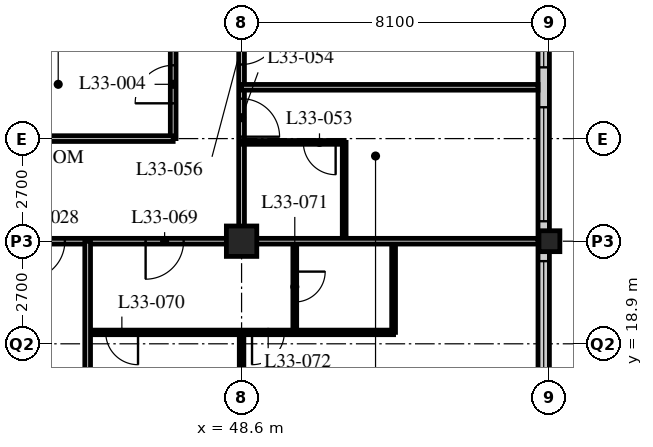
"""IFC4 building model, lengths in metres.
Left out: names, types, materials, properties, quantities, classifications, styles, units other than length and angle.
Written with IfcOpenShell. Run it as: python <this file> out.ifc"""

import sys

from ifc_helpers import new_model, si_unit, direction, frame, frame_2d, origin, origin_2d, place, context, subcontext, project, spatial, rectangle, hollow_rectangle, extrude, element, fill, save


model = new_model("IFC4")
c1 = context("Model", 3, precision=1e-05, world=origin(), true_north=direction((0.0, 1.0)))
c2 = subcontext(c1, "Body", "Model", "MODEL_VIEW")
j1 = project(units=[si_unit("LENGTHUNIT", "METRE"), si_unit("PLANEANGLEUNIT", "RADIAN")], contexts=[c1])
p1 = place(None, origin())
s1 = spatial("IfcSite", under=j1, at=p1, CompositionType="ELEMENT")
p2 = place(p1, origin())
s2 = spatial("IfcBuilding", under=s1, at=p2, CompositionType="ELEMENT")
p3 = place(p2, frame((0.0, 0.0, 130.6)))
s3 = spatial("IfcBuildingStorey", under=s2, at=p3, CompositionType="ELEMENT", Elevation=130.6)
p4 = place(p3, frame((48.6, 21.6, 0.0), z_axis=(0.0, 0.0, 1.0), x_axis=(1.0, 0.0, 0.0)))
e1 = element("IfcColumn", 1, at=p4, inside=s3, PredefinedType="COLUMN", context=c2, shape_type="SweptSolid", body=[
    extrude(hollow_rectangle(XDim=0.8, YDim=0.8, WallThickness=0.08, at=origin_2d()), origin(), (0.0, 0.0, 1.0), 3.4),
])
p5 = place(p3, frame((56.7, 21.6, 0.0), z_axis=(0.0, 0.0, 1.0), x_axis=(1.0, 0.0, 0.0)))
e2 = element("IfcColumn", 2, at=p5, inside=s3, PredefinedType="COLUMN", context=c2, shape_type="SweptSolid", body=[
    extrude(hollow_rectangle(XDim=0.55, YDim=0.55, WallThickness=0.04, at=origin_2d()), origin(), (0.0, 0.0, 1.0), 3.4),
])
p6 = place(p3, frame((56.55, 13.8, 0.0), z_axis=(0.0, 0.0, 1.0), x_axis=(0.0, 1.0, 0.0)))
e3 = element("IfcWall", 3, at=p6, inside=s3, PredefinedType="SOLIDWALL", context=c2, shape_type="SweptSolid", body=[
    extrude(rectangle(XDim=32.1, YDim=0.3, at=frame_2d((16.05, 0.0))), origin(), (0.0, 0.0, 1.0), 3.19),
])
p7 = place(p6, frame((0.225, 0.0, 0.9)))
e4 = element("IfcOpeningElement", 4, at=p7, cuts=e3, PredefinedType="OPENING", context=c2, shape_type="SweptSolid", body=[
    extrude(rectangle(XDim=3.0, YDim=2.0, at=frame_2d((1.5, 1.0))), frame((0.0, 0.16, 0.0), z_axis=(0.0, -1.0, 0.0), x_axis=(1.0, 0.0, 0.0)), (0.0, 0.0, 1.0), 0.32),
])
p8 = place(p6, frame((4.275, 0.0, 0.9)))
e5 = element("IfcOpeningElement", 5, at=p8, cuts=e3, PredefinedType="OPENING", context=c2, shape_type="SweptSolid", body=[
    extrude(rectangle(XDim=3.0, YDim=2.0, at=frame_2d((1.5, 1.0))), frame((0.0, 0.16, 0.0), z_axis=(0.0, -1.0, 0.0), x_axis=(1.0, 0.0, 0.0)), (0.0, 0.0, 1.0), 0.32),
])
p9 = place(p6, frame((8.325, 0.0, 0.9)))
e6 = element("IfcOpeningElement", 6, at=p9, cuts=e3, PredefinedType="OPENING", context=c2, shape_type="SweptSolid", body=[
    extrude(rectangle(XDim=3.0, YDim=2.0, at=frame_2d((1.5, 1.0))), frame((0.0, 0.16, 0.0), z_axis=(0.0, -1.0, 0.0), x_axis=(1.0, 0.0, 0.0)), (0.0, 0.0, 1.0), 0.32),
])
p10 = place(p6, frame((12.375, 0.0, 0.9)))
e7 = element("IfcOpeningElement", 7, at=p10, cuts=e3, PredefinedType="OPENING", context=c2, shape_type="SweptSolid", body=[
    extrude(rectangle(XDim=3.0, YDim=2.0, at=frame_2d((1.5, 1.0))), frame((0.0, 0.16, 0.0), z_axis=(0.0, -1.0, 0.0), x_axis=(1.0, 0.0, 0.0)), (0.0, 0.0, 1.0), 0.32),
])
p11 = place(p6, frame((16.425, 0.0, 0.9)))
e8 = element("IfcOpeningElement", 8, at=p11, cuts=e3, PredefinedType="OPENING", context=c2, shape_type="SweptSolid", body=[
    extrude(rectangle(XDim=3.0, YDim=2.0, at=frame_2d((1.5, 1.0))), frame((0.0, 0.16, 0.0), z_axis=(0.0, -1.0, 0.0), x_axis=(1.0, 0.0, 0.0)), (0.0, 0.0, 1.0), 0.32),
])
p12 = place(p6, frame((20.475, 0.0, 0.9)))
e9 = element("IfcOpeningElement", 9, at=p12, cuts=e3, PredefinedType="OPENING", context=c2, shape_type="SweptSolid", body=[
    extrude(rectangle(XDim=3.0, YDim=2.0, at=frame_2d((1.5, 1.0))), frame((0.0, 0.16, 0.0), z_axis=(0.0, -1.0, 0.0), x_axis=(1.0, 0.0, 0.0)), (0.0, 0.0, 1.0), 0.32),
])
p13 = place(p6, frame((24.525, 0.0, 0.9)))
e10 = element("IfcOpeningElement", 10, at=p13, cuts=e3, PredefinedType="OPENING", context=c2, shape_type="SweptSolid", body=[
    extrude(rectangle(XDim=3.0, YDim=2.0, at=frame_2d((1.5, 1.0))), frame((0.0, 0.16, 0.0), z_axis=(0.0, -1.0, 0.0), x_axis=(1.0, 0.0, 0.0)), (0.0, 0.0, 1.0), 0.32),
])
p14 = place(p6, frame((28.575, 0.0, 0.9)))
e11 = element("IfcOpeningElement", 11, at=p14, cuts=e3, PredefinedType="OPENING", context=c2, shape_type="SweptSolid", body=[
    extrude(rectangle(XDim=3.0, YDim=2.0, at=frame_2d((1.5, 1.0))), frame((0.0, 0.16, 0.0), z_axis=(0.0, -1.0, 0.0), x_axis=(1.0, 0.0, 0.0)), (0.0, 0.0, 1.0), 0.32),
])
p15 = place(p3, frame((8.1, 21.6, 0.0), z_axis=(0.0, 0.0, 1.0), x_axis=(1.0, 0.0, 0.0)))
e12 = element("IfcWall", 12, at=p15, inside=s3, PredefinedType="PARTITIONING", context=c2, shape_type="SweptSolid", body=[
    extrude(rectangle(XDim=40.5, YDim=0.15, at=frame_2d((20.25, 0.0))), origin(), (0.0, 0.0, 1.0), 2.578),
])
p16 = place(p15, frame((9.625, 0.0, 0.0)))
e13 = element("IfcOpeningElement", 13, at=p16, cuts=e12, PredefinedType="OPENING", context=c2, shape_type="SweptSolid", body=[
    extrude(rectangle(XDim=1.0, YDim=2.1, at=frame_2d((0.5, 1.05))), frame((0.0, 0.085, 0.0), z_axis=(0.0, -1.0, 0.0), x_axis=(1.0, 0.0, 0.0)), (0.0, 0.0, 1.0), 0.17),
])
p17 = place(p15, frame((21.775, 0.0, 0.0)))
e14 = element("IfcOpeningElement", 14, at=p17, cuts=e12, PredefinedType="OPENING", context=c2, shape_type="SweptSolid", body=[
    extrude(rectangle(XDim=1.0, YDim=2.1, at=frame_2d((0.5, 1.05))), frame((0.0, 0.085, 0.0), z_axis=(0.0, -1.0, 0.0), x_axis=(1.0, 0.0, 0.0)), (0.0, 0.0, 1.0), 0.17),
])
p18 = place(p15, frame((28.95, 0.0, 0.0)))
e15 = element("IfcOpeningElement", 15, at=p18, cuts=e12, PredefinedType="OPENING", context=c2, shape_type="SweptSolid", body=[
    extrude(rectangle(XDim=1.0, YDim=2.1, at=frame_2d((0.5, 1.05))), frame((0.0, 0.085, 0.0), z_axis=(0.0, -1.0, 0.0), x_axis=(1.0, 0.0, 0.0)), (0.0, 0.0, 1.0), 0.17),
])
p19 = place(p15, frame((34.85, 0.0, 0.0)))
e16 = element("IfcOpeningElement", 16, at=p19, cuts=e12, PredefinedType="OPENING", context=c2, shape_type="SweptSolid", body=[
    extrude(rectangle(XDim=1.0, YDim=2.1, at=frame_2d((0.5, 1.05))), frame((0.0, 0.085, 0.0), z_axis=(0.0, -1.0, 0.0), x_axis=(1.0, 0.0, 0.0)), (0.0, 0.0, 1.0), 0.17),
])
p20 = place(p15, frame((1.525, 0.0, 0.0)))
e17 = element("IfcOpeningElement", 17, at=p20, cuts=e12, PredefinedType="OPENING", context=c2, shape_type="SweptSolid", body=[
    extrude(rectangle(XDim=1.0, YDim=2.1, at=frame_2d((0.5, 1.05))), frame((0.0, 0.085, 0.0), z_axis=(0.0, -1.0, 0.0), x_axis=(1.0, 0.0, 0.0)), (0.0, 0.0, 1.0), 0.17),
])
p21 = place(p15, frame((37.975, 0.0, 0.0)))
e18 = element("IfcOpeningElement", 18, at=p21, cuts=e12, PredefinedType="OPENING", context=c2, shape_type="SweptSolid", body=[
    extrude(rectangle(XDim=1.0, YDim=2.1, at=frame_2d((0.5, 1.05))), frame((0.0, 0.085, 0.0), z_axis=(0.0, -1.0, 0.0), x_axis=(1.0, 0.0, 0.0)), (0.0, 0.0, 1.0), 0.17),
])
p22 = place(p3, frame((48.6, 21.6, 0.0), z_axis=(0.0, 0.0, 1.0), x_axis=(0.0, 1.0, 0.0)))
e19 = element("IfcWall", 19, at=p22, inside=s3, PredefinedType="PARTITIONING", context=c2, shape_type="SweptSolid", body=[
    extrude(rectangle(XDim=24.3, YDim=0.15, at=frame_2d((12.15, 0.0))), origin(), (0.0, 0.0, 1.0), 2.578),
])
p23 = place(p22, frame((2.75, 0.0, 0.0)))
e20 = element("IfcOpeningElement", 20, at=p23, cuts=e19, PredefinedType="OPENING", context=c2, shape_type="SweptSolid", body=[
    extrude(rectangle(XDim=1.0, YDim=2.1, at=frame_2d((0.5, 1.05))), frame((0.0, 0.085, 0.0), z_axis=(0.0, -1.0, 0.0), x_axis=(1.0, 0.0, 0.0)), (0.0, 0.0, 1.0), 0.17),
])
p24 = place(p22, frame((4.65, 0.0, 0.0)))
e21 = element("IfcOpeningElement", 21, at=p24, cuts=e19, PredefinedType="OPENING", context=c2, shape_type="SweptSolid", body=[
    extrude(rectangle(XDim=1.0, YDim=2.1, at=frame_2d((0.5, 1.05))), frame((0.0, 0.085, 0.0), z_axis=(0.0, -1.0, 0.0), x_axis=(1.0, 0.0, 0.0)), (0.0, 0.0, 1.0), 0.17),
])
p25 = place(p22, frame((10.0, 0.0, 0.0)))
e22 = element("IfcOpeningElement", 22, at=p25, cuts=e19, PredefinedType="OPENING", context=c2, shape_type="SweptSolid", body=[
    extrude(rectangle(XDim=1.0, YDim=2.1, at=frame_2d((0.5, 1.05))), frame((0.0, 0.085, 0.0), z_axis=(0.0, -1.0, 0.0), x_axis=(1.0, 0.0, 0.0)), (0.0, 0.0, 1.0), 0.17),
])
p26 = place(p22, frame((18.1, 0.0, 0.0)))
e23 = element("IfcOpeningElement", 23, at=p26, cuts=e19, PredefinedType="OPENING", context=c2, shape_type="SweptSolid", body=[
    extrude(rectangle(XDim=1.0, YDim=2.1, at=frame_2d((0.5, 1.05))), frame((0.0, 0.085, 0.0), z_axis=(0.0, -1.0, 0.0), x_axis=(1.0, 0.0, 0.0)), (0.0, 0.0, 1.0), 0.17),
])
p27 = place(p3, frame((46.8, 24.3, 0.0), z_axis=(0.0, 0.0, 1.0), x_axis=(0.0, 1.0, 0.0)))
e24 = element("IfcWall", 24, at=p27, inside=s3, PredefinedType="PARTITIONING", context=c2, shape_type="SweptSolid", body=[
    extrude(rectangle(XDim=19.8, YDim=0.15, at=frame_2d((9.9, 0.0))), origin(), (0.0, 0.0, 1.0), 3.19),
])
p28 = place(p27, frame((0.929, 0.0, 0.0)))
e25 = element("IfcOpeningElement", 25, at=p28, cuts=e24, PredefinedType="OPENING", context=c2, shape_type="SweptSolid", body=[
    extrude(rectangle(XDim=1.0, YDim=2.1, at=frame_2d((0.5, 1.05))), frame((0.0, 0.085, 0.0), z_axis=(0.0, -1.0, 0.0), x_axis=(1.0, 0.0, 0.0)), (0.0, 0.0, 1.0), 0.17),
])
p29 = place(p27, frame((4.979, 0.0, 0.0)))
e26 = element("IfcOpeningElement", 26, at=p29, cuts=e24, PredefinedType="OPENING", context=c2, shape_type="SweptSolid", body=[
    extrude(rectangle(XDim=1.0, YDim=2.1, at=frame_2d((0.5, 1.05))), frame((0.0, 0.085, 0.0), z_axis=(0.0, -1.0, 0.0), x_axis=(1.0, 0.0, 0.0)), (0.0, 0.0, 1.0), 0.17),
])
p30 = place(p27, frame((8.4, 0.0, 0.0)))
e27 = element("IfcOpeningElement", 27, at=p30, cuts=e24, PredefinedType="OPENING", context=c2, shape_type="SweptSolid", body=[
    extrude(rectangle(XDim=1.0, YDim=2.1, at=frame_2d((0.5, 1.05))), frame((0.0, 0.085, 0.0), z_axis=(0.0, -1.0, 0.0), x_axis=(1.0, 0.0, 0.0)), (0.0, 0.0, 1.0), 0.17),
])
p31 = place(p27, frame((12.45, 0.0, 0.0)))
e28 = element("IfcOpeningElement", 28, at=p31, cuts=e24, PredefinedType="OPENING", context=c2, shape_type="SweptSolid", body=[
    extrude(rectangle(XDim=1.0, YDim=2.1, at=frame_2d((0.5, 1.05))), frame((0.0, 0.085, 0.0), z_axis=(0.0, -1.0, 0.0), x_axis=(1.0, 0.0, 0.0)), (0.0, 0.0, 1.0), 0.17),
])
p32 = place(p3, frame((40.7, 24.3, 0.0), z_axis=(0.0, 0.0, 1.0), x_axis=(1.0, 0.0, 0.0)))
e29 = element("IfcWall", 29, at=p32, inside=s3, PredefinedType="PARTITIONING", context=c2, shape_type="SweptSolid", body=[
    extrude(rectangle(XDim=6.1, YDim=0.15, at=frame_2d((3.05, 0.0))), origin(), (0.0, 0.0, 1.0), 3.19),
])
p33 = place(p3, frame((51.3, 21.6, 0.0), z_axis=(0.0, 0.0, 1.0), x_axis=(0.0, 1.0, 0.0)))
e30 = element("IfcWall", 30, at=p33, inside=s3, PredefinedType="PARTITIONING", context=c2, shape_type="SweptSolid", body=[
    extrude(rectangle(XDim=2.6, YDim=0.1, at=frame_2d((1.3, 0.0))), origin(), (0.0, 0.0, 1.0), 3.19),
])
p34 = place(p3, frame((48.6, 24.2, 0.0), z_axis=(0.0, 0.0, 1.0), x_axis=(1.0, 0.0, 0.0)))
e31 = element("IfcWall", 31, at=p34, inside=s3, PredefinedType="PARTITIONING", context=c2, shape_type="SweptSolid", body=[
    extrude(rectangle(XDim=2.7, YDim=0.1, at=frame_2d((1.35, 0.0))), origin(), (0.0, 0.0, 1.0), 3.19),
])
p35 = place(p34, frame((1.625, 0.0, 0.0)))
e32 = element("IfcOpeningElement", 32, at=p35, cuts=e31, PredefinedType="OPENING", context=c2, shape_type="SweptSolid", body=[
    extrude(rectangle(XDim=0.85, YDim=2.1, at=frame_2d((0.425, 1.05))), frame((0.0, 0.06, 0.0), z_axis=(0.0, -1.0, 0.0), x_axis=(1.0, 0.0, 0.0)), (0.0, 0.0, 1.0), 0.12),
])
p36 = place(p3, frame((48.6, 25.65, 0.0), z_axis=(0.0, 0.0, 1.0), x_axis=(1.0, 0.0, 0.0)))
e33 = element("IfcWall", 33, at=p36, inside=s3, PredefinedType="PARTITIONING", context=c2, shape_type="SweptSolid", body=[
    extrude(rectangle(XDim=7.8, YDim=0.15, at=frame_2d((3.9, 0.0))), origin(), (0.0, 0.0, 1.0), 3.19),
])
p37 = place(p3, frame((44.55, 19.2, 0.0), z_axis=(0.0, 0.0, 1.0), x_axis=(1.0, 0.0, 0.0)))
e34 = element("IfcWall", 34, at=p37, inside=s3, PredefinedType="PARTITIONING", context=c2, shape_type="SweptSolid", body=[
    extrude(rectangle(XDim=8.05, YDim=0.12, at=frame_2d((4.025, 0.0))), origin(), (0.0, 0.0, 1.0), 3.19),
])
p38 = place(p37, frame((0.475, 0.0, 0.0)))
e35 = element("IfcOpeningElement", 35, at=p38, cuts=e34, PredefinedType="OPENING", context=c2, shape_type="SweptSolid", body=[
    extrude(rectangle(XDim=0.85, YDim=2.1, at=frame_2d((0.425, 1.05))), frame((0.0, 0.07, 0.0), z_axis=(0.0, -1.0, 0.0), x_axis=(1.0, 0.0, 0.0)), (0.0, 0.0, 1.0), 0.14),
])
p39 = place(p37, frame((4.325, 0.0, 0.0)))
e36 = element("IfcOpeningElement", 36, at=p39, cuts=e34, PredefinedType="OPENING", context=c2, shape_type="SweptSolid", body=[
    extrude(rectangle(XDim=0.85, YDim=2.1, at=frame_2d((0.425, 1.05))), frame((0.0, 0.07, 0.0), z_axis=(0.0, -1.0, 0.0), x_axis=(1.0, 0.0, 0.0)), (0.0, 0.0, 1.0), 0.14),
])
p40 = place(p3, frame((50.0, 21.6, 0.0), z_axis=(0.0, 0.0, 1.0), x_axis=(0.0, -1.0, 0.0)))
e37 = element("IfcWall", 37, at=p40, inside=s3, PredefinedType="PARTITIONING", context=c2, shape_type="SweptSolid", body=[
    extrude(rectangle(XDim=2.4, YDim=0.1, at=frame_2d((1.2, 0.0))), origin(), (0.0, 0.0, 1.0), 3.19),
])
p41 = place(p40, frame((0.8, 0.0, 0.0)))
e38 = element("IfcOpeningElement", 38, at=p41, cuts=e37, PredefinedType="OPENING", context=c2, shape_type="SweptSolid", body=[
    extrude(rectangle(XDim=0.8, YDim=2.1, at=frame_2d((0.4, 1.05))), frame((0.0, 0.06, 0.0), z_axis=(0.0, -1.0, 0.0), x_axis=(1.0, 0.0, 0.0)), (0.0, 0.0, 1.0), 0.12),
])
p42 = place(p3, frame((52.6, 21.6, 0.0), z_axis=(0.0, 0.0, 1.0), x_axis=(0.0, -1.0, 0.0)))
e39 = element("IfcWall", 39, at=p42, inside=s3, PredefinedType="PARTITIONING", context=c2, shape_type="SweptSolid", body=[
    extrude(rectangle(XDim=2.4, YDim=0.1, at=frame_2d((1.2, 0.0))), origin(), (0.0, 0.0, 1.0), 3.19),
])
p43 = place(p3, frame((48.6, 19.2, 0.0), z_axis=(0.0, 0.0, 1.0), x_axis=(0.0, -1.0, 0.0)))
e40 = element("IfcWall", 40, at=p43, inside=s3, PredefinedType="PARTITIONING", context=c2, shape_type="SweptSolid", body=[
    extrude(rectangle(XDim=9.45, YDim=0.12, at=frame_2d((4.725, 0.0))), origin(), (0.0, 0.0, 1.0), 2.578),
])
p44 = place(p3, frame((48.6, 21.6, 0.0), z_axis=(0.0, 0.0, 1.0), x_axis=(1.0, 0.0, 0.0)))
e41 = element("IfcWall", 41, at=p44, inside=s3, PredefinedType="PARTITIONING", context=c2, shape_type="SweptSolid", body=[
    extrude(rectangle(XDim=7.8, YDim=0.15, at=frame_2d((3.9, 0.0))), origin(), (0.0, 0.0, 1.0), 2.578),
])
p45 = place(p3, frame((44.55, 21.6, 0.0), z_axis=(0.0, 0.0, 1.0), x_axis=(0.0, -1.0, 0.0)))
e42 = element("IfcWall", 42, at=p45, inside=s3, PredefinedType="PARTITIONING", context=c2, shape_type="SweptSolid", body=[
    extrude(rectangle(XDim=15.9, YDim=0.15, at=frame_2d((7.95, 0.0))), origin(), (0.0, 0.0, 1.0), 3.19),
])
p46 = place(p8, origin())
e43 = element("IfcWindow", 43, at=p46, inside=s3, PartitioningType="SINGLE_PANEL", PredefinedType="WINDOW", context=c2, shape_type="SweptSolid", body=[
    extrude(rectangle(XDim=3.0, YDim=2.0, at=frame_2d((1.5, 1.0))), frame((0.0, 0.03, 0.0), z_axis=(0.0, -1.0, 0.0), x_axis=(1.0, 0.0, 0.0)), (0.0, 0.0, 1.0), 0.06),
])
fill(e5, e43)
p47 = place(p9, origin())
e44 = element("IfcWindow", 44, at=p47, inside=s3, PartitioningType="SINGLE_PANEL", PredefinedType="WINDOW", context=c2, shape_type="SweptSolid", body=[
    extrude(rectangle(XDim=3.0, YDim=2.0, at=frame_2d((1.5, 1.0))), frame((0.0, 0.03, 0.0), z_axis=(0.0, -1.0, 0.0), x_axis=(1.0, 0.0, 0.0)), (0.0, 0.0, 1.0), 0.06),
])
fill(e6, e44)
p48 = place(p10, origin())
e45 = element("IfcWindow", 45, at=p48, inside=s3, PartitioningType="SINGLE_PANEL", PredefinedType="WINDOW", context=c2, shape_type="SweptSolid", body=[
    extrude(rectangle(XDim=3.0, YDim=2.0, at=frame_2d((1.5, 1.0))), frame((0.0, 0.03, 0.0), z_axis=(0.0, -1.0, 0.0), x_axis=(1.0, 0.0, 0.0)), (0.0, 0.0, 1.0), 0.06),
])
fill(e7, e45)
p49 = place(p28, origin())
e46 = element("IfcDoor", 46, at=p49, inside=s3, OperationType="SINGLE_SWING_LEFT", PredefinedType="DOOR", context=c2, shape_type="SweptSolid", body=[
    extrude(rectangle(XDim=1.0, YDim=2.1, at=frame_2d((0.5, 1.05))), frame((0.0, 0.025, 0.0), z_axis=(0.0, -1.0, 0.0), x_axis=(1.0, 0.0, 0.0)), (0.0, 0.0, 1.0), 0.05),
])
fill(e25, e46)
p50 = place(p19, origin())
e47 = element("IfcDoor", 47, at=p50, inside=s3, OperationType="SINGLE_SWING_RIGHT", PredefinedType="DOOR", context=c2, shape_type="SweptSolid", body=[
    extrude(rectangle(XDim=1.0, YDim=2.1, at=frame_2d((0.5, 1.05))), frame((0.0, 0.025, 0.0), z_axis=(0.0, -1.0, 0.0), x_axis=(1.0, 0.0, 0.0)), (0.0, 0.0, 1.0), 0.05),
])
fill(e16, e47)
p51 = place(p35, origin())
e48 = element("IfcDoor", 48, at=p51, inside=s3, OperationType="SINGLE_SWING_LEFT", PredefinedType="DOOR", context=c2, shape_type="SweptSolid", body=[
    extrude(rectangle(XDim=0.85, YDim=2.1, at=frame_2d((0.425, 1.05))), frame((0.0, 0.025, 0.0), z_axis=(0.0, -1.0, 0.0), x_axis=(1.0, 0.0, 0.0)), (0.0, 0.0, 1.0), 0.05),
])
fill(e32, e48)
p52 = place(p23, origin())
e49 = element("IfcDoor", 49, at=p52, inside=s3, OperationType="SINGLE_SWING_RIGHT", PredefinedType="DOOR", context=c2, shape_type="SweptSolid", body=[
    extrude(rectangle(XDim=1.0, YDim=2.1, at=frame_2d((0.5, 1.05))), frame((0.0, 0.025, 0.0), z_axis=(0.0, -1.0, 0.0), x_axis=(1.0, 0.0, 0.0)), (0.0, 0.0, 1.0), 0.05),
])
fill(e20, e49)
p53 = place(p24, origin())
e50 = element("IfcDoor", 50, at=p53, inside=s3, OperationType="SINGLE_SWING_LEFT", PredefinedType="DOOR", context=c2, shape_type="SweptSolid", body=[
    extrude(rectangle(XDim=1.0, YDim=2.1, at=frame_2d((0.5, 1.05))), frame((0.0, 0.025, 0.0), z_axis=(0.0, -1.0, 0.0), x_axis=(1.0, 0.0, 0.0)), (0.0, 0.0, 1.0), 0.05),
])
fill(e21, e50)
p54 = place(p21, origin())
e51 = element("IfcDoor", 51, at=p54, inside=s3, OperationType="SINGLE_SWING_RIGHT", PredefinedType="DOOR", context=c2, shape_type="SweptSolid", body=[
    extrude(rectangle(XDim=1.0, YDim=2.1, at=frame_2d((0.5, 1.05))), frame((0.0, 0.025, 0.0), z_axis=(0.0, -1.0, 0.0), x_axis=(1.0, 0.0, 0.0)), (0.0, 0.0, 1.0), 0.05),
])
fill(e18, e51)
p55 = place(p38, origin())
e52 = element("IfcDoor", 52, at=p55, inside=s3, OperationType="SINGLE_SWING_LEFT", PredefinedType="DOOR", context=c2, shape_type="SweptSolid", body=[
    extrude(rectangle(XDim=0.85, YDim=2.1, at=frame_2d((0.425, 1.05))), frame((0.0, 0.025, 0.0), z_axis=(0.0, -1.0, 0.0), x_axis=(1.0, 0.0, 0.0)), (0.0, 0.0, 1.0), 0.05),
])
fill(e35, e52)
p56 = place(p41, origin())
e53 = element("IfcDoor", 53, at=p56, inside=s3, OperationType="SINGLE_SWING_LEFT", PredefinedType="DOOR", context=c2, shape_type="SweptSolid", body=[
    extrude(rectangle(XDim=0.8, YDim=2.1, at=frame_2d((0.4, 1.05))), frame((0.0, 0.025, 0.0), z_axis=(0.0, -1.0, 0.0), x_axis=(1.0, 0.0, 0.0)), (0.0, 0.0, 1.0), 0.05),
])
fill(e38, e53)
p57 = place(p39, origin())
e54 = element("IfcDoor", 54, at=p57, inside=s3, OperationType="SINGLE_SWING_RIGHT", PredefinedType="DOOR", context=c2, shape_type="SweptSolid", body=[
    extrude(rectangle(XDim=0.85, YDim=2.1, at=frame_2d((0.425, 1.05))), frame((0.0, 0.025, 0.0), z_axis=(0.0, -1.0, 0.0), x_axis=(1.0, 0.0, 0.0)), (0.0, 0.0, 1.0), 0.05),
])
fill(e36, e54)
save(model, sys.argv[1])
